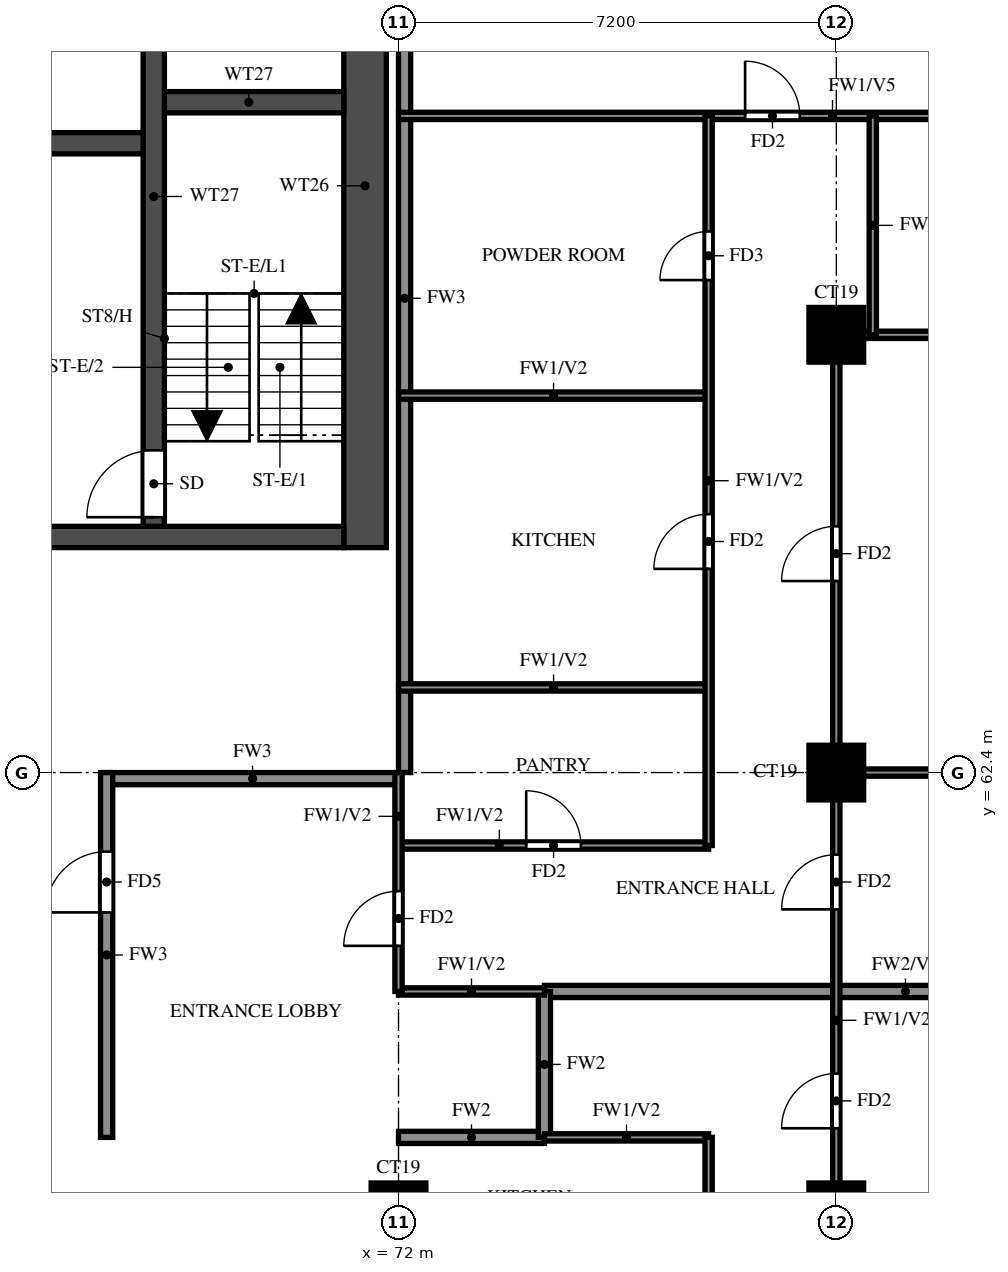
"""IFC4 building model, lengths in metres.
Left out: names, types, materials, properties, quantities, classifications, styles, units other than length and angle.
Written with IfcOpenShell. Run it as: python <this file> out.ifc"""

import sys

from ifc_helpers import new_model, si_unit, direction, frame, frame_2d, origin, origin_2d, place, context, subcontext, project, spatial, rectangle, extrude, source, transform, mapped, element, fill, save


model = new_model("IFC4")
c1 = context("Model", 3, precision=1e-05, world=origin(), true_north=direction((0.0, 1.0)))
c2 = subcontext(c1, "Body", "Model", "MODEL_VIEW")
j1 = project(units=[si_unit("LENGTHUNIT", "METRE"), si_unit("PLANEANGLEUNIT", "RADIAN")], contexts=[c1])
p1 = place(None, origin())
s1 = spatial("IfcSite", under=j1, at=p1, CompositionType="ELEMENT")
p2 = place(p1, origin())
s2 = spatial("IfcBuilding", under=s1, at=p2, CompositionType="ELEMENT")
p3 = place(p2, frame((0.0, 0.0, 181.5)))
s3 = spatial("IfcBuildingStorey", under=s2, at=p3, CompositionType="ELEMENT", Elevation=181.5)
m1 = source(origin(), c2, "Body", "SweptSolid", [
    extrude(rectangle(XDim=0.9, YDim=0.9, at=origin_2d()), origin(), (0.0, 0.0, 1.0), 3.2),
])
for number, where, z_axis, x_axis in (
    (1, (72.0, 55.2, 0.0), (0.0, 0.0, 1.0), (1.0, 0.0, 0.0)),
    (2, (79.2, 55.2, 0.0), (0.0, 0.0, 1.0), (1.0, 0.0, 0.0)),
    (3, (79.2, 62.4, 0.0), (0.0, 0.0, 1.0), (1.0, 0.0, 0.0)),
    (4, (79.2, 69.6, 0.0), (0.0, 0.0, 1.0), (1.0, 0.0, 0.0)),
):
    element("IfcColumn", number, at=place(p3, frame(where, z_axis=z_axis, x_axis=x_axis)), inside=s3, PredefinedType="COLUMN", context=c2, shape_type="MappedRepresentation", body=[
        mapped(m1, transform((0.0, 0.0, 0.0))),
    ])
p4 = place(p3, frame((71.45, 66.1, 0.0), z_axis=(0.0, 0.0, 1.0), x_axis=(0.0, 1.0, 0.0)))
e5 = element("IfcWall", 5, at=p4, inside=s3, PredefinedType="SHEAR", context=c2, shape_type="SweptSolid", body=[
    extrude(rectangle(XDim=11.9, YDim=0.7, at=frame_2d((5.95, 0.0))), origin(), (0.0, 0.0, 1.0), 3.2),
])
p5 = place(p3, frame((29.7, 66.275, 0.0), z_axis=(0.0, 0.0, 1.0), x_axis=(1.0, 0.0, 0.0)))
e6 = element("IfcWall", 6, at=p5, inside=s3, PredefinedType="SHEAR", context=c2, shape_type="SweptSolid", body=[
    extrude(rectangle(XDim=41.4, YDim=0.35, at=frame_2d((20.7, 0.0))), origin(), (0.0, 0.0, 1.0), 3.2),
])
p6 = place(p5, frame((0.925, 0.0, 0.0)))
e7 = element("IfcOpeningElement", 7, at=p6, cuts=e6, PredefinedType="OPENING", context=c2, shape_type="SweptSolid", body=[
    extrude(rectangle(XDim=1.1, YDim=2.1, at=frame_2d((0.55, 1.05))), frame((0.0, 0.185, 0.0), z_axis=(0.0, -1.0, 0.0), x_axis=(1.0, 0.0, 0.0)), (0.0, 0.0, 1.0), 0.37),
])
p7 = place(p5, frame((3.712, 0.0, 0.0)))
e8 = element("IfcOpeningElement", 8, at=p7, cuts=e6, PredefinedType="OPENING", context=c2, shape_type="SweptSolid", body=[
    extrude(rectangle(XDim=1.8, YDim=2.1, at=frame_2d((0.9, 1.05))), frame((0.0, 0.185, 0.0), z_axis=(0.0, -1.0, 0.0), x_axis=(1.0, 0.0, 0.0)), (0.0, 0.0, 1.0), 0.37),
])
p8 = place(p3, frame((32.825, 72.75, 0.0), z_axis=(0.0, 0.0, 1.0), x_axis=(1.0, 0.0, 0.0)))
e9 = element("IfcWall", 9, at=p8, inside=s3, PredefinedType="SHEAR", context=c2, shape_type="SweptSolid", body=[
    extrude(rectangle(XDim=35.15, YDim=0.35, at=frame_2d((17.575, 0.0))), origin(), (0.0, 0.0, 1.0), 3.2),
])
p9 = place(p8, frame((19.8, 0.0, 0.0)))
e10 = element("IfcOpeningElement", 10, at=p9, cuts=e9, PredefinedType="OPENING", context=c2, shape_type="SweptSolid", body=[
    extrude(rectangle(XDim=1.1, YDim=2.1, at=frame_2d((0.55, 1.05))), frame((0.0, 0.185, 0.0), z_axis=(0.0, -1.0, 0.0), x_axis=(1.0, 0.0, 0.0)), (0.0, 0.0, 1.0), 0.37),
])
p10 = place(p8, frame((27.7, 0.0, 0.0)))
e11 = element("IfcOpeningElement", 11, at=p10, cuts=e9, PredefinedType="OPENING", context=c2, shape_type="SweptSolid", body=[
    extrude(rectangle(XDim=1.1, YDim=2.1, at=frame_2d((0.55, 1.05))), frame((0.0, 0.185, 0.0), z_axis=(0.0, -1.0, 0.0), x_axis=(1.0, 0.0, 0.0)), (0.0, 0.0, 1.0), 0.37),
])
p11 = place(p8, frame((30.3, 0.0, 0.0)))
e12 = element("IfcOpeningElement", 12, at=p11, cuts=e9, PredefinedType="OPENING", context=c2, shape_type="SweptSolid", body=[
    extrude(rectangle(XDim=1.1, YDim=2.1, at=frame_2d((0.55, 1.05))), frame((0.0, 0.185, 0.0), z_axis=(0.0, -1.0, 0.0), x_axis=(1.0, 0.0, 0.0)), (0.0, 0.0, 1.0), 0.37),
])
p12 = place(p8, frame((3.8, 0.0, 0.0)))
e13 = element("IfcOpeningElement", 13, at=p12, cuts=e9, PredefinedType="OPENING", context=c2, shape_type="SweptSolid", body=[
    extrude(rectangle(XDim=1.1, YDim=2.1, at=frame_2d((0.55, 1.05))), frame((0.0, 0.185, 0.0), z_axis=(0.0, -1.0, 0.0), x_axis=(1.0, 0.0, 0.0)), (0.0, 0.0, 1.0), 0.37),
])
p13 = place(p8, frame((6.55, 0.0, 0.0)))
e14 = element("IfcOpeningElement", 14, at=p13, cuts=e9, PredefinedType="OPENING", context=c2, shape_type="SweptSolid", body=[
    extrude(rectangle(XDim=1.1, YDim=2.1, at=frame_2d((0.55, 1.05))), frame((0.0, 0.185, 0.0), z_axis=(0.0, -1.0, 0.0), x_axis=(1.0, 0.0, 0.0)), (0.0, 0.0, 1.0), 0.37),
])
p14 = place(p8, frame((9.3, 0.0, 0.0)))
e15 = element("IfcOpeningElement", 15, at=p14, cuts=e9, PredefinedType="OPENING", context=c2, shape_type="SweptSolid", body=[
    extrude(rectangle(XDim=1.1, YDim=2.1, at=frame_2d((0.55, 1.05))), frame((0.0, 0.185, 0.0), z_axis=(0.0, -1.0, 0.0), x_axis=(1.0, 0.0, 0.0)), (0.0, 0.0, 1.0), 0.37),
])
p15 = place(p8, frame((12.05, 0.0, 0.0)))
e16 = element("IfcOpeningElement", 16, at=p15, cuts=e9, PredefinedType="OPENING", context=c2, shape_type="SweptSolid", body=[
    extrude(rectangle(XDim=1.1, YDim=2.1, at=frame_2d((0.55, 1.05))), frame((0.0, 0.185, 0.0), z_axis=(0.0, -1.0, 0.0), x_axis=(1.0, 0.0, 0.0)), (0.0, 0.0, 1.0), 0.37),
])
p16 = place(p8, frame((14.8, 0.0, 0.0)))
e17 = element("IfcOpeningElement", 17, at=p16, cuts=e9, PredefinedType="OPENING", context=c2, shape_type="SweptSolid", body=[
    extrude(rectangle(XDim=1.1, YDim=2.1, at=frame_2d((0.55, 1.05))), frame((0.0, 0.185, 0.0), z_axis=(0.0, -1.0, 0.0), x_axis=(1.0, 0.0, 0.0)), (0.0, 0.0, 1.0), 0.37),
])
p17 = place(p8, frame((17.55, 0.0, 0.0)))
e18 = element("IfcOpeningElement", 18, at=p17, cuts=e9, PredefinedType="OPENING", context=c2, shape_type="SweptSolid", body=[
    extrude(rectangle(XDim=1.1, YDim=2.1, at=frame_2d((0.55, 1.05))), frame((0.0, 0.185, 0.0), z_axis=(0.0, -1.0, 0.0), x_axis=(1.0, 0.0, 0.0)), (0.0, 0.0, 1.0), 0.37),
])
p18 = place(p8, frame((0.938, 0.0, 0.0)))
e19 = element("IfcOpeningElement", 19, at=p18, cuts=e9, PredefinedType="OPENING", context=c2, shape_type="SweptSolid", body=[
    extrude(rectangle(XDim=1.1, YDim=2.1, at=frame_2d((0.55, 1.05))), frame((0.0, 0.185, 0.0), z_axis=(0.0, -1.0, 0.0), x_axis=(1.0, 0.0, 0.0)), (0.0, 0.0, 1.0), 0.37),
])
p19 = place(p3, frame((67.975, 73.425, 0.0), z_axis=(0.0, 0.0, 1.0), x_axis=(1.0, 0.0, 0.0)))
e20 = element("IfcWall", 20, at=p19, inside=s3, PredefinedType="SHEAR", context=c2, shape_type="SweptSolid", body=[
    extrude(rectangle(XDim=3.125, YDim=0.35, at=frame_2d((1.562, 0.0))), origin(), (0.0, 0.0, 1.0), 3.2),
])
p20 = place(p3, frame((67.975, 66.45, 0.0), z_axis=(0.0, 0.0, 1.0), x_axis=(0.0, 1.0, 0.0)))
e21 = element("IfcWall", 21, at=p20, inside=s3, PredefinedType="SHEAR", context=c2, shape_type="SweptSolid", body=[
    extrude(rectangle(XDim=10.85, YDim=0.35, at=frame_2d((5.425, 0.0))), origin(), (0.0, 0.0, 1.0), 3.2),
])
p21 = place(p20, frame((0.15, 0.0, 0.0)))
e22 = element("IfcOpeningElement", 22, at=p21, cuts=e21, PredefinedType="OPENING", context=c2, shape_type="SweptSolid", body=[
    extrude(rectangle(XDim=1.1, YDim=2.1, at=frame_2d((0.55, 1.05))), frame((0.0, 0.185, 0.0), z_axis=(0.0, -1.0, 0.0), x_axis=(1.0, 0.0, 0.0)), (0.0, 0.0, 1.0), 0.37),
])
p22 = place(p3, frame((67.2, 62.3, 0.0), z_axis=(0.0, 0.0, 1.0), x_axis=(1.0, 0.0, 0.0)))
e23 = element("IfcWall", 23, at=p22, inside=s3, PredefinedType="SOLIDWALL", context=c2, shape_type="SweptSolid", body=[
    extrude(rectangle(XDim=4.8, YDim=0.2, at=frame_2d((2.4, 0.0))), origin(), (0.0, 0.0, 1.0), 3.2),
])
p23 = place(p3, frame((67.2, 56.4, 0.0), z_axis=(0.0, 0.0, 1.0), x_axis=(0.0, 1.0, 0.0)))
e24 = element("IfcWall", 24, at=p23, inside=s3, PredefinedType="SOLIDWALL", context=c2, shape_type="SweptSolid", body=[
    extrude(rectangle(XDim=6.0, YDim=0.2, at=frame_2d((3.0, 0.0))), origin(), (0.0, 0.0, 1.0), 3.2),
])
p24 = place(p23, frame((3.7, 0.0, 0.0)))
e25 = element("IfcOpeningElement", 25, at=p24, cuts=e24, PredefinedType="OPENING", context=c2, shape_type="SweptSolid", body=[
    extrude(rectangle(XDim=1.0, YDim=2.1, at=frame_2d((0.5, 1.05))), frame((0.0, 0.11, 0.0), z_axis=(0.0, -1.0, 0.0), x_axis=(1.0, 0.0, 0.0)), (0.0, 0.0, 1.0), 0.22),
])
p25 = place(p3, frame((72.1, 62.4, 0.0), z_axis=(0.0, 0.0, 1.0), x_axis=(0.0, 1.0, 0.0)))
e26 = element("IfcWall", 26, at=p25, inside=s3, PredefinedType="SOLIDWALL", context=c2, shape_type="SweptSolid", body=[
    extrude(rectangle(XDim=15.6, YDim=0.2, at=frame_2d((7.8, 0.0))), origin(), (0.0, 0.0, 1.0), 3.2),
])
p26 = place(p3, frame((72.0, 56.4, 0.0), z_axis=(0.0, 0.0, 1.0), x_axis=(1.0, 0.0, 0.0)))
e27 = element("IfcWall", 27, at=p26, inside=s3, PredefinedType="SOLIDWALL", context=c2, shape_type="SweptSolid", body=[
    extrude(rectangle(XDim=2.4, YDim=0.2, at=frame_2d((1.2, 0.0))), origin(), (0.0, 0.0, 1.0), 3.2),
])
p27 = place(p3, frame((74.4, 58.8, 0.0), z_axis=(0.0, 0.0, 1.0), x_axis=(1.0, 0.0, 0.0)))
e28 = element("IfcWall", 28, at=p27, inside=s3, PredefinedType="SOLIDWALL", context=c2, shape_type="SweptSolid", body=[
    extrude(rectangle(XDim=11.875, YDim=0.2, at=frame_2d((5.938, 0.0))), origin(), (0.0, 0.0, 1.0), 2.3),
])
p28 = place(p3, frame((74.4, 56.4, 0.0), z_axis=(0.0, 0.0, 1.0), x_axis=(0.0, 1.0, 0.0)))
e29 = element("IfcWall", 29, at=p28, inside=s3, PredefinedType="SOLIDWALL", context=c2, shape_type="SweptSolid", body=[
    extrude(rectangle(XDim=2.4, YDim=0.2, at=frame_2d((1.2, 0.0))), origin(), (0.0, 0.0, 1.0), 3.2),
])
p29 = place(p3, frame((74.4, 56.4, 0.0), z_axis=(0.0, 0.0, 1.0), x_axis=(1.0, 0.0, 0.0)))
e30 = element("IfcWall", 30, at=p29, inside=s3, PredefinedType="PARTITIONING", context=c2, shape_type="SweptSolid", body=[
    extrude(rectangle(XDim=2.7, YDim=0.12, at=frame_2d((1.35, 0.0))), origin(), (0.0, 0.0, 1.0), 3.2),
])
p30 = place(p3, frame((72.0, 58.8, 0.0), z_axis=(0.0, 0.0, 1.0), x_axis=(1.0, 0.0, 0.0)))
e31 = element("IfcWall", 31, at=p30, inside=s3, PredefinedType="PARTITIONING", context=c2, shape_type="SweptSolid", body=[
    extrude(rectangle(XDim=2.4, YDim=0.12, at=frame_2d((1.2, 0.0))), origin(), (0.0, 0.0, 1.0), 3.2),
])
p31 = place(p3, frame((72.0, 61.2, 0.0), z_axis=(0.0, 0.0, 1.0), x_axis=(1.0, 0.0, 0.0)))
e32 = element("IfcWall", 32, at=p31, inside=s3, PredefinedType="PARTITIONING", context=c2, shape_type="SweptSolid", body=[
    extrude(rectangle(XDim=5.1, YDim=0.12, at=frame_2d((2.55, 0.0))), origin(), (0.0, 0.0, 1.0), 3.2),
])
p32 = place(p31, frame((2.1, 0.0, 0.0)))
e33 = element("IfcOpeningElement", 33, at=p32, cuts=e32, PredefinedType="OPENING", context=c2, shape_type="SweptSolid", body=[
    extrude(rectangle(XDim=0.9, YDim=2.1, at=frame_2d((0.45, 1.05))), frame((0.0, 0.07, 0.0), z_axis=(0.0, -1.0, 0.0), x_axis=(1.0, 0.0, 0.0)), (0.0, 0.0, 1.0), 0.14),
])
p33 = place(p3, frame((79.2, 62.4, 0.0), z_axis=(0.0, 0.0, 1.0), x_axis=(1.0, 0.0, 0.0)))
e34 = element("IfcWall", 34, at=p33, inside=s3, PredefinedType="PARTITIONING", context=c2, shape_type="SweptSolid", body=[
    extrude(rectangle(XDim=7.075, YDim=0.12, at=frame_2d((3.538, 0.0))), origin(), (0.0, 0.0, 1.0), 3.2),
])
for number, where, z_axis, x_axis in (
    (35, (72.0, 63.8, 0.0), (0.0, 0.0, 1.0), (1.0, 0.0, 0.0)),
    (36, (72.0, 68.6, 0.0), (0.0, 0.0, 1.0), (1.0, 0.0, 0.0)),
):
    element("IfcWall", number, at=place(p3, frame(where, z_axis=z_axis, x_axis=x_axis)), inside=s3, PredefinedType="PARTITIONING", context=c2, shape_type="SweptSolid", body=[
        extrude(rectangle(XDim=5.1, YDim=0.12, at=frame_2d((2.55, 0.0))), origin(), (0.0, 0.0, 1.0), 3.2),
    ])
p34 = place(p3, frame((79.2, 69.6, 0.0), z_axis=(0.0, 0.0, 1.0), x_axis=(1.0, 0.0, 0.0)))
e37 = element("IfcWall", 37, at=p34, inside=s3, PredefinedType="PARTITIONING", context=c2, shape_type="SweptSolid", body=[
    extrude(rectangle(XDim=7.075, YDim=0.12, at=frame_2d((3.538, 0.0))), origin(), (0.0, 0.0, 1.0), 3.2),
])
p35 = place(p34, frame((3.438, 0.0, 0.0)))
e38 = element("IfcOpeningElement", 38, at=p35, cuts=e37, PredefinedType="OPENING", context=c2, shape_type="SweptSolid", body=[
    extrude(rectangle(XDim=0.8, YDim=2.1, at=frame_2d((0.4, 1.05))), frame((0.0, 0.07, 0.0), z_axis=(0.0, -1.0, 0.0), x_axis=(1.0, 0.0, 0.0)), (0.0, 0.0, 1.0), 0.14),
])
p36 = place(p3, frame((72.0, 73.2, 0.0), z_axis=(0.0, 0.0, 1.0), x_axis=(1.0, 0.0, 0.0)))
e39 = element("IfcWall", 39, at=p36, inside=s3, PredefinedType="PARTITIONING", context=c2, shape_type="SweptSolid", body=[
    extrude(rectangle(XDim=14.275, YDim=0.12, at=frame_2d((7.137, 0.0))), origin(), (0.0, 0.0, 1.0), 2.3),
])
p37 = place(p36, frame((5.7, 0.0, 0.0)))
e40 = element("IfcOpeningElement", 40, at=p37, cuts=e39, PredefinedType="OPENING", context=c2, shape_type="SweptSolid", body=[
    extrude(rectangle(XDim=0.9, YDim=2.1, at=frame_2d((0.45, 1.05))), frame((0.0, 0.07, 0.0), z_axis=(0.0, -1.0, 0.0), x_axis=(1.0, 0.0, 0.0)), (0.0, 0.0, 1.0), 0.14),
])
p38 = place(p3, frame((72.0, 58.8, 0.0), z_axis=(0.0, 0.0, 1.0), x_axis=(0.0, 1.0, 0.0)))
e41 = element("IfcWall", 41, at=p38, inside=s3, PredefinedType="PARTITIONING", context=c2, shape_type="SweptSolid", body=[
    extrude(rectangle(XDim=3.6, YDim=0.12, at=frame_2d((1.8, 0.0))), origin(), (0.0, 0.0, 1.0), 3.2),
])
p39 = place(p38, frame((0.75, 0.0, 0.0)))
e42 = element("IfcOpeningElement", 42, at=p39, cuts=e41, PredefinedType="OPENING", context=c2, shape_type="SweptSolid", body=[
    extrude(rectangle(XDim=0.9, YDim=2.1, at=frame_2d((0.45, 1.05))), frame((0.0, 0.07, 0.0), z_axis=(0.0, -1.0, 0.0), x_axis=(1.0, 0.0, 0.0)), (0.0, 0.0, 1.0), 0.14),
])
p40 = place(p3, frame((77.1, 54.0, 0.0), z_axis=(0.0, 0.0, 1.0), x_axis=(0.0, 1.0, 0.0)))
e43 = element("IfcWall", 43, at=p40, inside=s3, PredefinedType="PARTITIONING", context=c2, shape_type="SweptSolid", body=[
    extrude(rectangle(XDim=2.4, YDim=0.12, at=frame_2d((1.2, 0.0))), origin(), (0.0, 0.0, 1.0), 3.2),
])
p41 = place(p3, frame((77.1, 61.2, 0.0), z_axis=(0.0, 0.0, 1.0), x_axis=(0.0, 1.0, 0.0)))
e44 = element("IfcWall", 44, at=p41, inside=s3, PredefinedType="PARTITIONING", context=c2, shape_type="SweptSolid", body=[
    extrude(rectangle(XDim=12.0, YDim=0.12, at=frame_2d((6.0, 0.0))), origin(), (0.0, 0.0, 1.0), 3.2),
])
p42 = place(p41, frame((4.55, 0.0, 0.0)))
e45 = element("IfcOpeningElement", 45, at=p42, cuts=e44, PredefinedType="OPENING", context=c2, shape_type="SweptSolid", body=[
    extrude(rectangle(XDim=0.9, YDim=2.1, at=frame_2d((0.45, 1.05))), frame((0.0, 0.07, 0.0), z_axis=(0.0, -1.0, 0.0), x_axis=(1.0, 0.0, 0.0)), (0.0, 0.0, 1.0), 0.14),
])
p43 = place(p41, frame((9.3, 0.0, 0.0)))
e46 = element("IfcOpeningElement", 46, at=p43, cuts=e44, PredefinedType="OPENING", context=c2, shape_type="SweptSolid", body=[
    extrude(rectangle(XDim=0.8, YDim=2.1, at=frame_2d((0.4, 1.05))), frame((0.0, 0.07, 0.0), z_axis=(0.0, -1.0, 0.0), x_axis=(1.0, 0.0, 0.0)), (0.0, 0.0, 1.0), 0.14),
])
p44 = place(p3, frame((79.2, 48.125, 0.0), z_axis=(0.0, 0.0, 1.0), x_axis=(0.0, 1.0, 0.0)))
e47 = element("IfcWall", 47, at=p44, inside=s3, PredefinedType="PARTITIONING", context=c2, shape_type="SweptSolid", body=[
    extrude(rectangle(XDim=21.475, YDim=0.12, at=frame_2d((10.738, 0.0))), origin(), (0.0, 0.0, 1.0), 3.2),
])
p45 = place(p44, frame((2.788, 0.0, 0.0)))
e48 = element("IfcOpeningElement", 48, at=p45, cuts=e47, PredefinedType="OPENING", context=c2, shape_type="SweptSolid", body=[
    extrude(rectangle(XDim=1.5, YDim=2.1, at=frame_2d((0.75, 1.05))), frame((0.0, 0.07, 0.0), z_axis=(0.0, -1.0, 0.0), x_axis=(1.0, 0.0, 0.0)), (0.0, 0.0, 1.0), 0.14),
])
p46 = place(p44, frame((8.425, 0.0, 0.0)))
e49 = element("IfcOpeningElement", 49, at=p46, cuts=e47, PredefinedType="OPENING", context=c2, shape_type="SweptSolid", body=[
    extrude(rectangle(XDim=0.9, YDim=2.1, at=frame_2d((0.45, 1.05))), frame((0.0, 0.07, 0.0), z_axis=(0.0, -1.0, 0.0), x_axis=(1.0, 0.0, 0.0)), (0.0, 0.0, 1.0), 0.14),
])
p47 = place(p44, frame((12.025, 0.0, 0.0)))
e50 = element("IfcOpeningElement", 50, at=p47, cuts=e47, PredefinedType="OPENING", context=c2, shape_type="SweptSolid", body=[
    extrude(rectangle(XDim=0.9, YDim=2.1, at=frame_2d((0.45, 1.05))), frame((0.0, 0.07, 0.0), z_axis=(0.0, -1.0, 0.0), x_axis=(1.0, 0.0, 0.0)), (0.0, 0.0, 1.0), 0.14),
])
p48 = place(p44, frame((17.425, 0.0, 0.0)))
e51 = element("IfcOpeningElement", 51, at=p48, cuts=e47, PredefinedType="OPENING", context=c2, shape_type="SweptSolid", body=[
    extrude(rectangle(XDim=0.9, YDim=2.1, at=frame_2d((0.45, 1.05))), frame((0.0, 0.07, 0.0), z_axis=(0.0, -1.0, 0.0), x_axis=(1.0, 0.0, 0.0)), (0.0, 0.0, 1.0), 0.14),
])
p49 = place(p3, frame((79.8, 69.6, 0.0), z_axis=(0.0, 0.0, 1.0), x_axis=(0.0, 1.0, 0.0)))
e52 = element("IfcWall", 52, at=p49, inside=s3, PredefinedType="PARTITIONING", context=c2, shape_type="SweptSolid", body=[
    extrude(rectangle(XDim=3.6, YDim=0.12, at=frame_2d((1.8, 0.0))), origin(), (0.0, 0.0, 1.0), 3.2),
])
p50 = place(p21, origin())
e53 = element("IfcDoor", 53, at=p50, inside=s3, OperationType="SINGLE_SWING_LEFT", PredefinedType="DOOR", context=c2, shape_type="SweptSolid", body=[
    extrude(rectangle(XDim=1.1, YDim=2.1, at=frame_2d((0.55, 1.05))), frame((0.0, 0.025, 0.0), z_axis=(0.0, -1.0, 0.0), x_axis=(1.0, 0.0, 0.0)), (0.0, 0.0, 1.0), 0.05),
])
fill(e22, e53)
p51 = place(p46, origin())
e54 = element("IfcDoor", 54, at=p51, inside=s3, OperationType="SINGLE_SWING_RIGHT", PredefinedType="DOOR", context=c2, shape_type="SweptSolid", body=[
    extrude(rectangle(XDim=0.9, YDim=2.1, at=frame_2d((0.45, 1.05))), frame((0.0, 0.025, 0.0), z_axis=(0.0, -1.0, 0.0), x_axis=(1.0, 0.0, 0.0)), (0.0, 0.0, 1.0), 0.05),
])
fill(e49, e54)
p52 = place(p39, origin())
e55 = element("IfcDoor", 55, at=p52, inside=s3, OperationType="SINGLE_SWING_LEFT", PredefinedType="DOOR", context=c2, shape_type="SweptSolid", body=[
    extrude(rectangle(XDim=0.9, YDim=2.1, at=frame_2d((0.45, 1.05))), frame((0.0, 0.025, 0.0), z_axis=(0.0, -1.0, 0.0), x_axis=(1.0, 0.0, 0.0)), (0.0, 0.0, 1.0), 0.05),
])
fill(e42, e55)
p53 = place(p24, origin())
e56 = element("IfcDoor", 56, at=p53, inside=s3, OperationType="SINGLE_SWING_RIGHT", PredefinedType="DOOR", context=c2, shape_type="SweptSolid", body=[
    extrude(rectangle(XDim=1.0, YDim=2.1, at=frame_2d((0.5, 1.05))), frame((0.0, 0.025, 0.0), z_axis=(0.0, -1.0, 0.0), x_axis=(1.0, 0.0, 0.0)), (0.0, 0.0, 1.0), 0.05),
])
fill(e25, e56)
p54 = place(p47, origin())
e57 = element("IfcDoor", 57, at=p54, inside=s3, OperationType="SINGLE_SWING_LEFT", PredefinedType="DOOR", context=c2, shape_type="SweptSolid", body=[
    extrude(rectangle(XDim=0.9, YDim=2.1, at=frame_2d((0.45, 1.05))), frame((0.0, 0.025, 0.0), z_axis=(0.0, -1.0, 0.0), x_axis=(1.0, 0.0, 0.0)), (0.0, 0.0, 1.0), 0.05),
])
fill(e50, e57)
p55 = place(p48, origin())
e58 = element("IfcDoor", 58, at=p55, inside=s3, OperationType="SINGLE_SWING_LEFT", PredefinedType="DOOR", context=c2, shape_type="SweptSolid", body=[
    extrude(rectangle(XDim=0.9, YDim=2.1, at=frame_2d((0.45, 1.05))), frame((0.0, 0.025, 0.0), z_axis=(0.0, -1.0, 0.0), x_axis=(1.0, 0.0, 0.0)), (0.0, 0.0, 1.0), 0.05),
])
fill(e51, e58)
p56 = place(p37, origin())
e59 = element("IfcDoor", 59, at=p56, inside=s3, OperationType="SINGLE_SWING_LEFT", PredefinedType="DOOR", context=c2, shape_type="SweptSolid", body=[
    extrude(rectangle(XDim=0.9, YDim=2.1, at=frame_2d((0.45, 1.05))), frame((0.0, 0.025, 0.0), z_axis=(0.0, -1.0, 0.0), x_axis=(1.0, 0.0, 0.0)), (0.0, 0.0, 1.0), 0.05),
])
fill(e40, e59)
p57 = place(p32, origin())
e60 = element("IfcDoor", 60, at=p57, inside=s3, OperationType="SINGLE_SWING_LEFT", PredefinedType="DOOR", context=c2, shape_type="SweptSolid", body=[
    extrude(rectangle(XDim=0.9, YDim=2.1, at=frame_2d((0.45, 1.05))), frame((0.0, 0.025, 0.0), z_axis=(0.0, -1.0, 0.0), x_axis=(1.0, 0.0, 0.0)), (0.0, 0.0, 1.0), 0.05),
])
fill(e33, e60)
p58 = place(p42, origin())
e61 = element("IfcDoor", 61, at=p58, inside=s3, OperationType="SINGLE_SWING_RIGHT", PredefinedType="DOOR", context=c2, shape_type="SweptSolid", body=[
    extrude(rectangle(XDim=0.9, YDim=2.1, at=frame_2d((0.45, 1.05))), frame((0.0, 0.025, 0.0), z_axis=(0.0, -1.0, 0.0), x_axis=(1.0, 0.0, 0.0)), (0.0, 0.0, 1.0), 0.05),
])
fill(e45, e61)
p59 = place(p43, origin())
e62 = element("IfcDoor", 62, at=p59, inside=s3, OperationType="SINGLE_SWING_LEFT", PredefinedType="DOOR", context=c2, shape_type="SweptSolid", body=[
    extrude(rectangle(XDim=0.8, YDim=2.1, at=frame_2d((0.4, 1.05))), frame((0.0, 0.025, 0.0), z_axis=(0.0, -1.0, 0.0), x_axis=(1.0, 0.0, 0.0)), (0.0, 0.0, 1.0), 0.05),
])
fill(e46, e62)
save(model, sys.argv[1])
